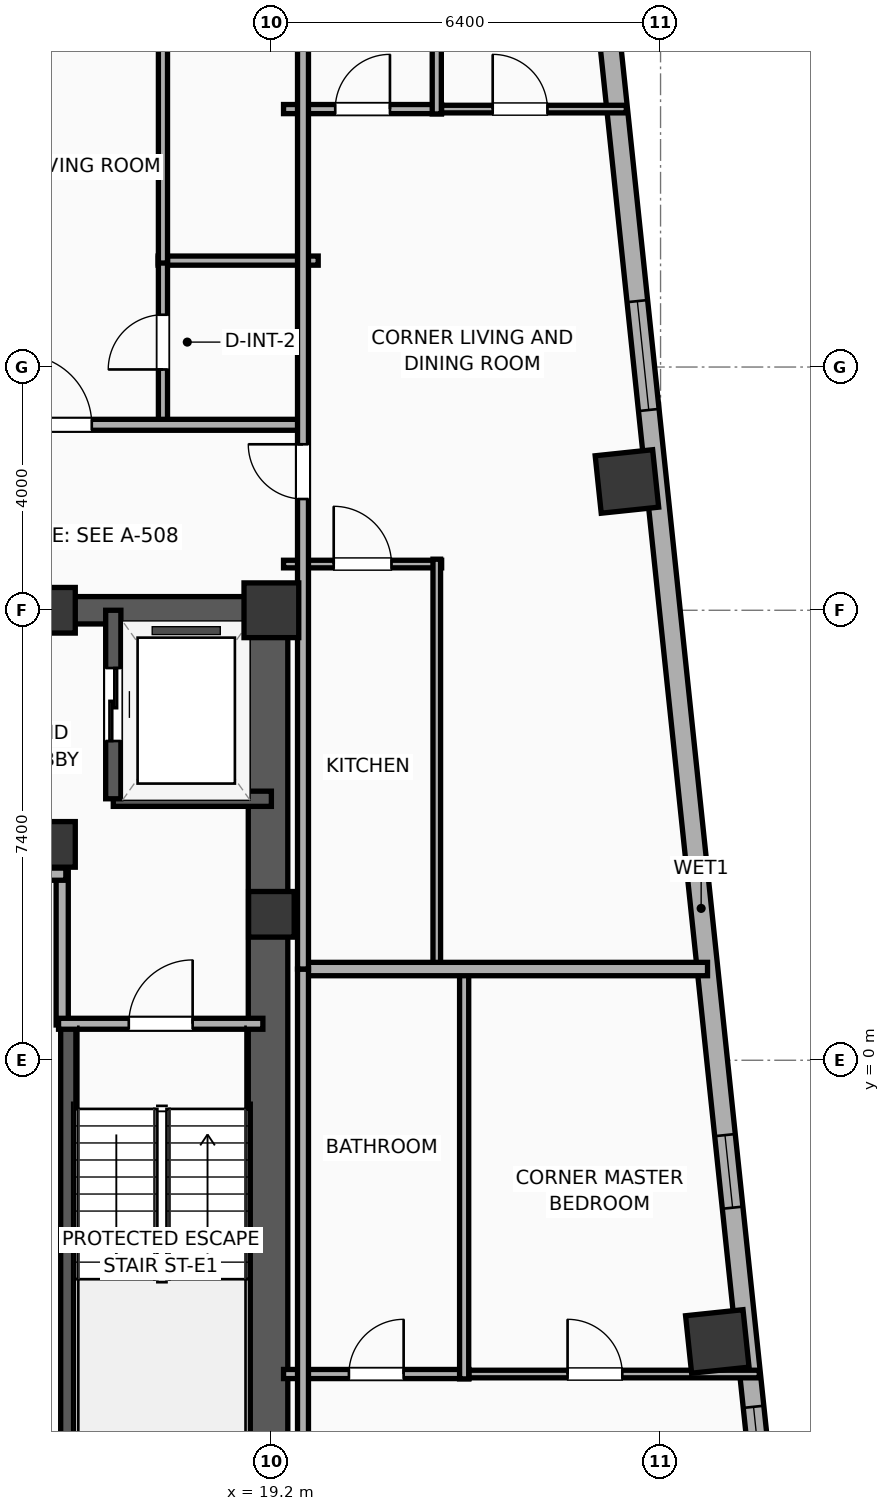
"""IFC4 building model, lengths in metres.
Left out: names, types, materials, properties, quantities, classifications, styles, units other than length and angle.
Written with IfcOpenShell. Run it as: python <this file> out.ifc"""

import sys

from ifc_helpers import new_model, si_unit, direction, frame, frame_2d, origin, origin_2d, place, context, subcontext, project, spatial, rectangle, hollow_rectangle, extrude, element, fill, save


model = new_model("IFC4")
c1 = context("Model", 3, precision=1e-05, world=origin(), true_north=direction((0.0, 1.0)))
c2 = subcontext(c1, "Body", "Model", "MODEL_VIEW")
j1 = project(units=[si_unit("LENGTHUNIT", "METRE"), si_unit("PLANEANGLEUNIT", "RADIAN")], contexts=[c1])
p1 = place(None, origin())
s1 = spatial("IfcSite", under=j1, at=p1, CompositionType="ELEMENT")
p2 = place(p1, origin())
s2 = spatial("IfcBuilding", under=s1, at=p2, CompositionType="ELEMENT")
p3 = place(p2, frame((0.0, 0.0, 159.9)))
s3 = spatial("IfcBuildingStorey", under=s2, at=p3, CompositionType="ELEMENT", Elevation=159.9)
for number, where, z_axis, x_axis in (
    (1, (15.6, 3.55, 0.0), (0.0, 0.0, 1.0), (1.0, 0.0, 0.0)),
    (2, (15.6, 7.4, 0.0), (0.0, 0.0, 1.0), (1.0, 0.0, 0.0)),
    (3, (19.2, 2.4, 0.0), (0.0, 0.0, 1.0), (1.0, 0.0, 0.0)),
):
    element("IfcColumn", number, at=place(p3, frame(where, z_axis=z_axis, x_axis=x_axis)), inside=s3, PredefinedType="COLUMN", context=c2, shape_type="SweptSolid", body=[
        extrude(rectangle(XDim=0.75, YDim=0.75, at=origin_2d()), origin(), (0.0, 0.0, 1.0), 3.9),
    ])
p4 = place(p3, frame((19.2, 7.4, 0.0), z_axis=(0.0, 0.0, 1.0), x_axis=(1.0, 0.0, 0.0)))
e4 = element("IfcColumn", 4, at=p4, inside=s3, PredefinedType="COLUMN", context=c2, shape_type="SweptSolid", body=[
    extrude(rectangle(XDim=0.9, YDim=0.9, at=origin_2d()), origin(), (0.0, 0.0, 1.0), 3.9),
])
p5 = place(p3, frame((12.175, 7.4, 0.0), z_axis=(0.0, 0.0, 1.0), x_axis=(1.0, 0.0, 0.0)))
e5 = element("IfcWall", 5, at=p5, inside=s3, PredefinedType="SHEAR", context=c2, shape_type="SweptSolid", body=[
    extrude(rectangle(XDim=7.25, YDim=0.45, at=frame_2d((3.625, 0.0))), origin(), (0.0, 0.0, 1.0), 3.65),
])
p6 = place(p3, frame((19.145, -7.4, 0.0), z_axis=(0.0, 0.0, 1.0), x_axis=(0.0, 1.0, 0.0)))
e6 = element("IfcWall", 6, at=p6, inside=s3, PredefinedType="SHEAR", context=c2, shape_type="SweptSolid", body=[
    extrude(rectangle(XDim=14.8, YDim=0.65, at=frame_2d((7.4, 0.0))), origin(), (0.0, 0.0, 1.0), 3.65),
])
p7 = place(p3, frame((15.86, -7.085, 0.0), z_axis=(0.0, 0.0, 1.0), x_axis=(0.0, 1.0, 0.0)))
e7 = element("IfcWall", 7, at=p7, inside=s3, PredefinedType="SOLIDWALL", context=c2, shape_type="SweptSolid", body=[
    extrude(rectangle(XDim=7.685, YDim=0.25, at=frame_2d((3.843, 0.0))), origin(), (0.0, 0.0, 1.0), 3.65),
])
for number, where, z_axis, x_axis in (
    (8, (26.533, -4.624, 0.0), (0.0, 0.0, 1.0), (0.995, 0.105, 0.0)),
    (9, (25.047, 9.518, 0.0), (0.0, 0.0, 1.0), (0.995, 0.105, 0.0)),
):
    element("IfcColumn", number, at=place(p3, frame(where, z_axis=z_axis, x_axis=x_axis)), inside=s3, PredefinedType="COLUMN", context=c2, shape_type="SweptSolid", body=[
        extrude(hollow_rectangle(XDim=0.95, YDim=0.95, WallThickness=0.032, at=origin_2d()), origin(), (0.0, 0.0, 1.0), 3.9),
    ])
p8 = place(p3, frame((24.534, 18.99, 0.0), z_axis=(0.0, 0.0, 1.0), x_axis=(0.104534959766, -0.994521212537, 0.0)))
e10 = element("IfcWall", 10, at=p8, inside=s3, PredefinedType="ELEMENTEDWALL", context=c2, shape_type="SweptSolid", body=[
    extrude(rectangle(XDim=33.166, YDim=0.34, at=frame_2d((16.583, 0.0))), origin(), (0.0, 0.0, 1.0), 3.65),
])
p9 = place(p8, frame((6.542, 0.0, 0.75)))
e11 = element("IfcOpeningElement", 11, at=p9, cuts=e10, PredefinedType="OPENING", context=c2, shape_type="SweptSolid", body=[
    extrude(rectangle(XDim=1.8, YDim=2.1, at=frame_2d((0.9, 1.05))), frame((0.0, 0.18, 0.0), z_axis=(0.0, -1.0, 0.0), x_axis=(1.0, 0.0, 0.0)), (0.0, 0.0, 1.0), 0.36),
])
p10 = place(p8, frame((24.825, 0.0, 0.75)))
e12 = element("IfcOpeningElement", 12, at=p10, cuts=e10, PredefinedType="OPENING", context=c2, shape_type="SweptSolid", body=[
    extrude(rectangle(XDim=1.8, YDim=2.1, at=frame_2d((0.9, 1.05))), frame((0.0, 0.18, 0.0), z_axis=(0.0, -1.0, 0.0), x_axis=(1.0, 0.0, 0.0)), (0.0, 0.0, 1.0), 0.36),
])
p11 = place(p8, frame((20.332, 0.0, 0.75)))
e13 = element("IfcOpeningElement", 13, at=p11, cuts=e10, PredefinedType="OPENING", context=c2, shape_type="SweptSolid", body=[
    extrude(rectangle(XDim=1.2, YDim=2.05, at=frame_2d((0.6, 1.025))), frame((0.0, 0.18, 0.0), z_axis=(0.0, -1.0, 0.0), x_axis=(1.0, 0.0, 0.0)), (0.0, 0.0, 1.0), 0.36),
])
p12 = place(p3, frame((16.6, 4.3, 0.0), z_axis=(0.0, 0.0, 1.0), x_axis=(1.0, 0.0, 0.0)))
e14 = element("IfcWall", 14, at=p12, inside=s3, PredefinedType="SOLIDWALL", context=c2, shape_type="SweptSolid", body=[
    extrude(rectangle(XDim=2.6, YDim=0.25, at=frame_2d((1.3, 0.0))), origin(), (0.0, 0.0, 1.0), 3.65),
])
p13 = place(p3, frame((16.6, 7.4, 0.0), z_axis=(0.0, 0.0, 1.0), x_axis=(0.0, -1.0, 0.0)))
e15 = element("IfcWall", 15, at=p13, inside=s3, PredefinedType="SOLIDWALL", context=c2, shape_type="SweptSolid", body=[
    extrude(rectangle(XDim=3.1, YDim=0.25, at=frame_2d((1.55, 0.0))), origin(), (0.0, 0.0, 1.0), 3.65),
])
p14 = place(p13, frame((0.95, 0.0, 0.0)))
e16 = element("IfcOpeningElement", 16, at=p14, cuts=e15, PredefinedType="OPENING", context=c2, shape_type="SweptSolid", body=[
    extrude(rectangle(XDim=1.2, YDim=2.05, at=frame_2d((0.6, 1.025))), frame((0.0, 0.135, 0.0), z_axis=(0.0, -1.0, 0.0), x_axis=(1.0, 0.0, 0.0)), (0.0, 0.0, 1.0), 0.27),
])
p15 = place(p3, frame((15.76, 0.58, 0.0), z_axis=(0.0, 0.0, 1.0), x_axis=(0.0, 1.0, 0.0)))
e17 = element("IfcWall", 17, at=p15, inside=s3, PredefinedType="PARTITIONING", context=c2, shape_type="SweptSolid", body=[
    extrude(rectangle(XDim=2.52, YDim=0.2, at=frame_2d((1.26, 0.0))), origin(), (0.0, 0.0, 1.0), 3.65),
])
p16 = place(p3, frame((12.66, 3.06, 0.0), z_axis=(0.0, 0.0, 1.0), x_axis=(1.0, 0.0, 0.0)))
e18 = element("IfcWall", 18, at=p16, inside=s3, PredefinedType="PARTITIONING", context=c2, shape_type="SweptSolid", body=[
    extrude(rectangle(XDim=3.16, YDim=0.2, at=frame_2d((1.58, 0.0))), origin(), (0.0, 0.0, 1.0), 3.65),
])
p17 = place(p3, frame((15.7, 0.6, 0.0), z_axis=(0.0, 0.0, 1.0), x_axis=(1.0, 0.0, 0.0)))
e19 = element("IfcWall", 19, at=p17, inside=s3, PredefinedType="PARTITIONING", context=c2, shape_type="SweptSolid", body=[
    extrude(rectangle(XDim=3.36, YDim=0.18, at=frame_2d((1.68, 0.0))), origin(), (0.0, 0.0, 1.0), 3.65),
])
p18 = place(p17, frame((1.155, 0.0, 0.0)))
e20 = element("IfcOpeningElement", 20, at=p18, cuts=e19, PredefinedType="OPENING", context=c2, shape_type="SweptSolid", body=[
    extrude(rectangle(XDim=1.05, YDim=2.05, at=frame_2d((0.525, 1.025))), frame((0.0, 0.1, 0.0), z_axis=(0.0, -1.0, 0.0), x_axis=(1.0, 0.0, 0.0)), (0.0, 0.0, 1.0), 0.2),
])
p19 = place(p3, frame((17.337, 13.15, 0.0), z_axis=(0.0, 0.0, 1.0), x_axis=(1.0, 0.0, 0.0)))
e21 = element("IfcWall", 21, at=p19, inside=s3, PredefinedType="PLUMBINGWALL", context=c2, shape_type="SweptSolid", body=[
    extrude(rectangle(XDim=2.633, YDim=0.15, at=frame_2d((1.316, 0.0))), origin(), (0.0, 0.0, 1.0), 3.65),
])
p20 = place(p3, frame((17.417, 10.43, 0.0), z_axis=(0.0, 0.0, 1.0), x_axis=(0.0, 1.0, 0.0)))
e22 = element("IfcWall", 22, at=p20, inside=s3, PredefinedType="PLUMBINGWALL", context=c2, shape_type="SweptSolid", body=[
    extrude(rectangle(XDim=2.76, YDim=0.15, at=frame_2d((1.38, 0.0))), origin(), (0.0, 0.0, 1.0), 3.65),
])
p21 = place(p20, frame((0.93, 0.0, 0.0)))
e23 = element("IfcOpeningElement", 23, at=p21, cuts=e22, PredefinedType="OPENING", context=c2, shape_type="SweptSolid", body=[
    extrude(rectangle(XDim=0.9, YDim=2.05, at=frame_2d((0.45, 1.025))), frame((0.0, 0.085, 0.0), z_axis=(0.0, -1.0, 0.0), x_axis=(1.0, 0.0, 0.0)), (0.0, 0.0, 1.0), 0.17),
])
p22 = place(p3, frame((17.417, 13.11, 0.0), z_axis=(0.0, 0.0, 1.0), x_axis=(0.0, 1.0, 0.0)))
e24 = element("IfcWall", 24, at=p22, inside=s3, PredefinedType="PLUMBINGWALL", context=c2, shape_type="SweptSolid", body=[
    extrude(rectangle(XDim=8.949, YDim=0.15, at=frame_2d((4.475, 0.0))), origin(), (0.0, 0.0, 1.0), 3.65),
])
p23 = place(p22, frame((4.025, 0.0, 0.0)))
e25 = element("IfcOpeningElement", 25, at=p23, cuts=e24, PredefinedType="OPENING", context=c2, shape_type="SweptSolid", body=[
    extrude(rectangle(XDim=0.9, YDim=2.05, at=frame_2d((0.45, 1.025))), frame((0.0, 0.085, 0.0), z_axis=(0.0, -1.0, 0.0), x_axis=(1.0, 0.0, 0.0)), (0.0, 0.0, 1.0), 0.17),
])
p24 = place(p3, frame((8.08, 10.45, 0.0), z_axis=(0.0, 0.0, 1.0), x_axis=(1.0, 0.0, 0.0)))
e26 = element("IfcWall", 26, at=p24, inside=s3, PredefinedType="PARTITIONING", context=c2, shape_type="SweptSolid", body=[
    extrude(rectangle(XDim=11.67, YDim=0.18, at=frame_2d((5.835, 0.0))), origin(), (0.0, 0.0, 1.0), 3.65),
])
p25 = place(p24, frame((2.604, 0.0, 0.0)))
e27 = element("IfcOpeningElement", 27, at=p25, cuts=e26, PredefinedType="OPENING", context=c2, shape_type="SweptSolid", body=[
    extrude(rectangle(XDim=0.9, YDim=2.05, at=frame_2d((0.45, 1.025))), frame((0.0, 0.1, 0.0), z_axis=(0.0, -1.0, 0.0), x_axis=(1.0, 0.0, 0.0)), (0.0, 0.0, 1.0), 0.2),
])
p26 = place(p24, frame((7.016, 0.0, 0.0)))
e28 = element("IfcOpeningElement", 28, at=p26, cuts=e26, PredefinedType="OPENING", context=c2, shape_type="SweptSolid", body=[
    extrude(rectangle(XDim=1.15, YDim=2.05, at=frame_2d((0.575, 1.025))), frame((0.0, 0.1, 0.0), z_axis=(0.0, -1.0, 0.0), x_axis=(1.0, 0.0, 0.0)), (0.0, 0.0, 1.0), 0.2),
])
p27 = place(p3, frame((22.31, -5.16, 0.0), z_axis=(0.0, 0.0, 1.0), x_axis=(1.0, 0.0, 0.0)))
e29 = element("IfcWall", 29, at=p27, inside=s3, PredefinedType="PARTITIONING", context=c2, shape_type="SweptSolid", body=[
    extrude(rectangle(XDim=4.913, YDim=0.125, at=frame_2d((2.457, 0.0))), origin(), (0.0, 0.0, 1.0), 3.04),
])
p28 = place(p27, frame((1.761, 0.0, 0.0)))
e30 = element("IfcOpeningElement", 30, at=p28, cuts=e29, PredefinedType="OPENING", context=c2, shape_type="SweptSolid", body=[
    extrude(rectangle(XDim=0.9, YDim=2.05, at=frame_2d((0.45, 1.025))), frame((0.0, 0.073, 0.0), z_axis=(0.0, -1.0, 0.0), x_axis=(1.0, 0.0, 0.0)), (0.0, 0.0, 1.0), 0.145),
])
p29 = place(p3, frame((19.4, -5.16, 0.0), z_axis=(0.0, 0.0, 1.0), x_axis=(1.0, 0.0, 0.0)))
e31 = element("IfcWall", 31, at=p29, inside=s3, PredefinedType="PLUMBINGWALL", context=c2, shape_type="SweptSolid", body=[
    extrude(rectangle(XDim=3.05, YDim=0.15, at=frame_2d((1.525, 0.0))), origin(), (0.0, 0.0, 1.0), 3.65),
])
p30 = place(p29, frame((1.075, 0.0, 0.0)))
e32 = element("IfcOpeningElement", 32, at=p30, cuts=e31, PredefinedType="OPENING", context=c2, shape_type="SweptSolid", body=[
    extrude(rectangle(XDim=0.9, YDim=2.05, at=frame_2d((0.45, 1.025))), frame((0.0, 0.085, 0.0), z_axis=(0.0, -1.0, 0.0), x_axis=(1.0, 0.0, 0.0)), (0.0, 0.0, 1.0), 0.17),
])
p31 = place(p3, frame((22.37, -5.24, 0.0), z_axis=(0.0, 0.0, 1.0), x_axis=(0.0, 1.0, 0.0)))
e33 = element("IfcWall", 33, at=p31, inside=s3, PredefinedType="PLUMBINGWALL", context=c2, shape_type="SweptSolid", body=[
    extrude(rectangle(XDim=6.72, YDim=0.15, at=frame_2d((3.36, 0.0))), origin(), (0.0, 0.0, 1.0), 3.65),
])
p32 = place(p3, frame((21.86, 15.642, 0.0), z_axis=(0.0, 0.0, 1.0), x_axis=(1.0, 0.0, 0.0)))
e34 = element("IfcWall", 34, at=p32, inside=s3, PredefinedType="PARTITIONING", context=c2, shape_type="SweptSolid", body=[
    extrude(rectangle(XDim=3.177, YDim=0.125, at=frame_2d((1.588, 0.0))), origin(), (0.0, 0.0, 1.0), 3.65),
])
p33 = place(p32, frame((0.979, 0.0, 0.0)))
e35 = element("IfcOpeningElement", 35, at=p33, cuts=e34, PredefinedType="OPENING", context=c2, shape_type="SweptSolid", body=[
    extrude(rectangle(XDim=0.9, YDim=2.05, at=frame_2d((0.45, 1.025))), frame((0.0, 0.073, 0.0), z_axis=(0.0, -1.0, 0.0), x_axis=(1.0, 0.0, 0.0)), (0.0, 0.0, 1.0), 0.145),
])
p34 = place(p3, frame((19.4, 8.16, 0.0), z_axis=(0.0, 0.0, 1.0), x_axis=(1.0, 0.0, 0.0)))
e36 = element("IfcWall", 36, at=p34, inside=s3, PredefinedType="PARTITIONING", context=c2, shape_type="SweptSolid", body=[
    extrude(rectangle(XDim=2.6, YDim=0.125, at=frame_2d((1.3, 0.0))), origin(), (0.0, 0.0, 1.0), 3.04),
])
p35 = place(p34, frame((0.825, 0.0, 0.0)))
e37 = element("IfcOpeningElement", 37, at=p35, cuts=e36, PredefinedType="OPENING", context=c2, shape_type="SweptSolid", body=[
    extrude(rectangle(XDim=0.95, YDim=2.05, at=frame_2d((0.475, 1.025))), frame((0.0, 0.073, 0.0), z_axis=(0.0, -1.0, 0.0), x_axis=(1.0, 0.0, 0.0)), (0.0, 0.0, 1.0), 0.145),
])
p36 = place(p3, frame((19.4, 15.642, 0.0), z_axis=(0.0, 0.0, 1.0), x_axis=(1.0, 0.0, 0.0)))
e38 = element("IfcWall", 38, at=p36, inside=s3, PredefinedType="PLUMBINGWALL", context=c2, shape_type="SweptSolid", body=[
    extrude(rectangle(XDim=2.6, YDim=0.15, at=frame_2d((1.3, 0.0))), origin(), (0.0, 0.0, 1.0), 3.65),
])
p37 = place(p36, frame((0.85, 0.0, 0.0)))
e39 = element("IfcOpeningElement", 39, at=p37, cuts=e38, PredefinedType="OPENING", context=c2, shape_type="SweptSolid", body=[
    extrude(rectangle(XDim=0.9, YDim=2.05, at=frame_2d((0.45, 1.025))), frame((0.0, 0.085, 0.0), z_axis=(0.0, -1.0, 0.0), x_axis=(1.0, 0.0, 0.0)), (0.0, 0.0, 1.0), 0.17),
])
p38 = place(p3, frame((21.92, 1.52, 0.0), z_axis=(0.0, 0.0, 1.0), x_axis=(0.0, 1.0, 0.0)))
e40 = element("IfcWall", 40, at=p38, inside=s3, PredefinedType="PARTITIONING", context=c2, shape_type="SweptSolid", body=[
    extrude(rectangle(XDim=6.72, YDim=0.125, at=frame_2d((3.36, 0.0))), origin(), (0.0, 0.0, 1.0), 3.65),
])
p39 = place(p3, frame((21.92, 15.562, 0.0), z_axis=(0.0, 0.0, 1.0), x_axis=(0.0, 1.0, 0.0)))
e41 = element("IfcWall", 41, at=p39, inside=s3, PredefinedType="PLUMBINGWALL", context=c2, shape_type="SweptSolid", body=[
    extrude(rectangle(XDim=6.696, YDim=0.15, at=frame_2d((3.348, 0.0))), origin(), (0.0, 0.0, 1.0), 3.04),
])
p40 = place(p3, frame((19.72, 1.5, 0.0), z_axis=(0.0, 0.0, 1.0), x_axis=(1.0, 0.0, 0.0)))
e42 = element("IfcWall", 42, at=p40, inside=s3, PredefinedType="PARTITIONING", context=c2, shape_type="SweptSolid", body=[
    extrude(rectangle(XDim=6.653, YDim=0.22, at=frame_2d((3.326, 0.0))), origin(), (0.0, 0.0, 1.0), 3.65),
])
p41 = place(p3, frame((19.72, -18.532, 0.0), z_axis=(0.0, 0.0, 1.0), x_axis=(0.0, 1.0, 0.0)))
e43 = element("IfcWall", 43, at=p41, inside=s3, PredefinedType="PARTITIONING", context=c2, shape_type="SweptSolid", body=[
    extrude(rectangle(XDim=20.032, YDim=0.18, at=frame_2d((10.016, 0.0))), origin(), (0.0, 0.0, 1.0), 3.65),
])
p42 = place(p41, frame((8.402, 0.0, 0.0)))
e44 = element("IfcOpeningElement", 44, at=p42, cuts=e43, PredefinedType="OPENING", context=c2, shape_type="SweptSolid", body=[
    extrude(rectangle(XDim=0.9, YDim=2.05, at=frame_2d((0.45, 1.025))), frame((0.0, 0.1, 0.0), z_axis=(0.0, -1.0, 0.0), x_axis=(1.0, 0.0, 0.0)), (0.0, 0.0, 1.0), 0.2),
])
p43 = place(p3, frame((19.72, 1.5, 0.0), z_axis=(0.0, 0.0, 1.0), x_axis=(0.0, 1.0, 0.0)))
e45 = element("IfcWall", 45, at=p43, inside=s3, PredefinedType="PARTITIONING", context=c2, shape_type="SweptSolid", body=[
    extrude(rectangle(XDim=20.65, YDim=0.18, at=frame_2d((10.325, 0.0))), origin(), (0.0, 0.0, 1.0), 3.04),
])
p44 = place(p43, frame((7.729, 0.0, 0.0)))
e46 = element("IfcOpeningElement", 46, at=p44, cuts=e45, PredefinedType="OPENING", context=c2, shape_type="SweptSolid", body=[
    extrude(rectangle(XDim=0.9, YDim=2.05, at=frame_2d((0.45, 1.025))), frame((0.0, 0.1, 0.0), z_axis=(0.0, -1.0, 0.0), x_axis=(1.0, 0.0, 0.0)), (0.0, 0.0, 1.0), 0.2),
])
p45 = place(p9, origin())
e47 = element("IfcWindow", 47, at=p45, inside=s3, PartitioningType="SINGLE_PANEL", PredefinedType="WINDOW", context=c2, shape_type="SweptSolid", body=[
    extrude(rectangle(XDim=1.8, YDim=2.1, at=frame_2d((0.9, 1.05))), frame((0.0, 0.03, 0.0), z_axis=(0.0, -1.0, 0.0), x_axis=(1.0, 0.0, 0.0)), (0.0, 0.0, 1.0), 0.06),
])
fill(e11, e47)
p46 = place(p10, origin())
e48 = element("IfcWindow", 48, at=p46, inside=s3, PartitioningType="SINGLE_PANEL", PredefinedType="WINDOW", context=c2, shape_type="SweptSolid", body=[
    extrude(rectangle(XDim=1.8, YDim=2.1, at=frame_2d((0.9, 1.05))), frame((0.0, 0.03, 0.0), z_axis=(0.0, -1.0, 0.0), x_axis=(1.0, 0.0, 0.0)), (0.0, 0.0, 1.0), 0.06),
])
fill(e12, e48)
p47 = place(p11, origin())
e49 = element("IfcWindow", 49, at=p47, inside=s3, PartitioningType="SINGLE_PANEL", PredefinedType="WINDOW", context=c2, shape_type="SweptSolid", body=[
    extrude(rectangle(XDim=1.2, YDim=2.05, at=frame_2d((0.6, 1.025))), frame((0.0, 0.03, 0.0), z_axis=(0.0, -1.0, 0.0), x_axis=(1.0, 0.0, 0.0)), (0.0, 0.0, 1.0), 0.06),
])
fill(e13, e49)
p48 = place(p14, origin())
e50 = element("IfcDoor", 50, at=p48, inside=s3, OperationType="SLIDING_TO_LEFT", PredefinedType="DOOR", context=c2, shape_type="SweptSolid", body=[
    extrude(rectangle(XDim=1.2, YDim=2.05, at=frame_2d((0.6, 1.025))), frame((0.0, 0.025, 0.0), z_axis=(0.0, -1.0, 0.0), x_axis=(1.0, 0.0, 0.0)), (0.0, 0.0, 1.0), 0.05),
])
fill(e16, e50)
p49 = place(p18, origin())
e51 = element("IfcDoor", 51, at=p49, inside=s3, OperationType="SINGLE_SWING_RIGHT", PredefinedType="DOOR", context=c2, shape_type="SweptSolid", body=[
    extrude(rectangle(XDim=1.05, YDim=2.05, at=frame_2d((0.525, 1.025))), frame((0.0, 0.025, 0.0), z_axis=(0.0, -1.0, 0.0), x_axis=(1.0, 0.0, 0.0)), (0.0, 0.0, 1.0), 0.05),
])
fill(e20, e51)
p50 = place(p21, origin())
e52 = element("IfcDoor", 52, at=p50, inside=s3, OperationType="SINGLE_SWING_LEFT", PredefinedType="DOOR", context=c2, shape_type="SweptSolid", body=[
    extrude(rectangle(XDim=0.9, YDim=2.05, at=frame_2d((0.45, 1.025))), frame((0.0, 0.025, 0.0), z_axis=(0.0, -1.0, 0.0), x_axis=(1.0, 0.0, 0.0)), (0.0, 0.0, 1.0), 0.05),
])
fill(e23, e52)
p51 = place(p26, origin())
e53 = element("IfcDoor", 53, at=p51, inside=s3, OperationType="SINGLE_SWING_LEFT", PredefinedType="DOOR", context=c2, shape_type="SweptSolid", body=[
    extrude(rectangle(XDim=1.15, YDim=2.05, at=frame_2d((0.575, 1.025))), frame((0.0, 0.025, 0.0), z_axis=(0.0, -1.0, 0.0), x_axis=(1.0, 0.0, 0.0)), (0.0, 0.0, 1.0), 0.05),
])
fill(e28, e53)
p52 = place(p28, origin())
e54 = element("IfcDoor", 54, at=p52, inside=s3, OperationType="SINGLE_SWING_LEFT", PredefinedType="DOOR", context=c2, shape_type="SweptSolid", body=[
    extrude(rectangle(XDim=0.9, YDim=2.05, at=frame_2d((0.45, 1.025))), frame((0.0, 0.025, 0.0), z_axis=(0.0, -1.0, 0.0), x_axis=(1.0, 0.0, 0.0)), (0.0, 0.0, 1.0), 0.05),
])
fill(e30, e54)
p53 = place(p30, origin())
e55 = element("IfcDoor", 55, at=p53, inside=s3, OperationType="SINGLE_SWING_RIGHT", PredefinedType="DOOR", context=c2, shape_type="SweptSolid", body=[
    extrude(rectangle(XDim=0.9, YDim=2.05, at=frame_2d((0.45, 1.025))), frame((0.0, 0.025, 0.0), z_axis=(0.0, -1.0, 0.0), x_axis=(1.0, 0.0, 0.0)), (0.0, 0.0, 1.0), 0.05),
])
fill(e32, e55)
p54 = place(p33, origin())
e56 = element("IfcDoor", 56, at=p54, inside=s3, OperationType="SINGLE_SWING_LEFT", PredefinedType="DOOR", context=c2, shape_type="SweptSolid", body=[
    extrude(rectangle(XDim=0.9, YDim=2.05, at=frame_2d((0.45, 1.025))), frame((0.0, 0.025, 0.0), z_axis=(0.0, -1.0, 0.0), x_axis=(1.0, 0.0, 0.0)), (0.0, 0.0, 1.0), 0.05),
])
fill(e35, e56)
p55 = place(p35, origin())
e57 = element("IfcDoor", 57, at=p55, inside=s3, OperationType="SINGLE_SWING_LEFT", PredefinedType="DOOR", context=c2, shape_type="SweptSolid", body=[
    extrude(rectangle(XDim=0.95, YDim=2.05, at=frame_2d((0.475, 1.025))), frame((0.0, 0.025, 0.0), z_axis=(0.0, -1.0, 0.0), x_axis=(1.0, 0.0, 0.0)), (0.0, 0.0, 1.0), 0.05),
])
fill(e37, e57)
p56 = place(p37, origin())
e58 = element("IfcDoor", 58, at=p56, inside=s3, OperationType="SINGLE_SWING_RIGHT", PredefinedType="DOOR", context=c2, shape_type="SweptSolid", body=[
    extrude(rectangle(XDim=0.9, YDim=2.05, at=frame_2d((0.45, 1.025))), frame((0.0, 0.025, 0.0), z_axis=(0.0, -1.0, 0.0), x_axis=(1.0, 0.0, 0.0)), (0.0, 0.0, 1.0), 0.05),
])
fill(e39, e58)
p57 = place(p44, origin())
e59 = element("IfcDoor", 59, at=p57, inside=s3, OperationType="SINGLE_SWING_RIGHT", PredefinedType="DOOR", context=c2, shape_type="SweptSolid", body=[
    extrude(rectangle(XDim=0.9, YDim=2.05, at=frame_2d((0.45, 1.025))), frame((0.0, 0.025, 0.0), z_axis=(0.0, -1.0, 0.0), x_axis=(1.0, 0.0, 0.0)), (0.0, 0.0, 1.0), 0.05),
])
fill(e46, e59)
save(model, sys.argv[1])
